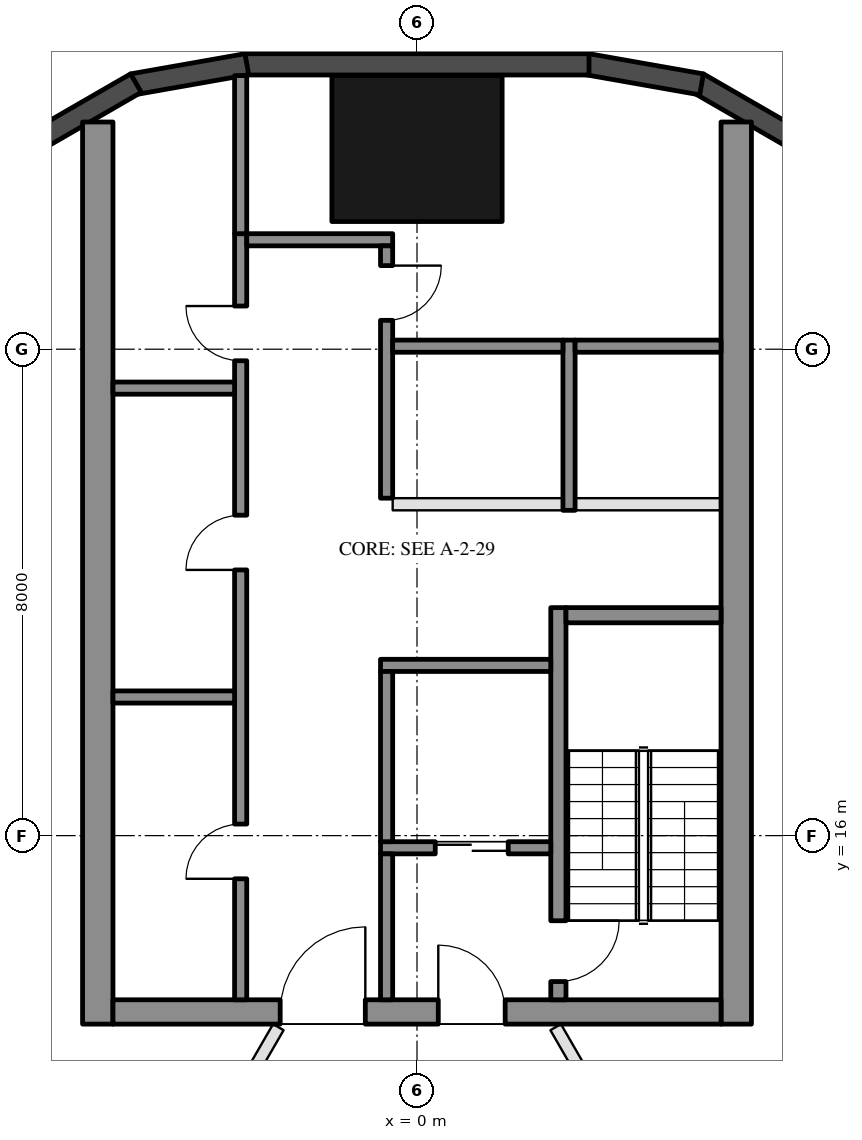
"""IFC4 building model, lengths in metres.
Left out: names, types, materials, properties, quantities, classifications, styles, units other than length and angle.
Written with IfcOpenShell. Run it as: python <this file> out.ifc"""

import sys

from ifc_helpers import new_model, si_unit, direction, frame, frame_2d, origin, origin_2d, place, context, subcontext, project, spatial, rectangle, hollow_rectangle, extrude, element, fill, save


model = new_model("IFC4")
c1 = context("Model", 3, precision=1e-05, world=origin(), true_north=direction((0.0, 1.0)))
c2 = subcontext(c1, "Body", "Model", "MODEL_VIEW")
j1 = project(units=[si_unit("LENGTHUNIT", "METRE"), si_unit("PLANEANGLEUNIT", "RADIAN")], contexts=[c1])
p1 = place(None, origin())
s1 = spatial("IfcSite", under=j1, at=p1, CompositionType="ELEMENT")
p2 = place(p1, origin())
s2 = spatial("IfcBuilding", under=s1, at=p2, CompositionType="ELEMENT")
p3 = place(p2, frame((0.0, 0.0, 127.9)))
s3 = spatial("IfcBuildingStorey", under=s2, at=p3, CompositionType="ELEMENT", Elevation=127.9)
p4 = place(p3, frame((0.0, 27.3, 0.0), z_axis=(0.0, 0.0, 1.0), x_axis=(1.0, 0.0, 0.0)))
e1 = element("IfcColumn", 1, at=p4, inside=s3, PredefinedType="COLUMN", context=c2, shape_type="SweptSolid", body=[
    extrude(hollow_rectangle(XDim=2.8, YDim=2.4, WallThickness=0.07, at=origin_2d()), origin(), (0.0, 0.0, 1.0), 3.7),
])
for number, where, z_axis, x_axis in (
    (2, (6.277, 27.422, 0.0), (0.0, 0.0, 1.0), (-0.866, 0.5, 0.0)),
    (3, (4.68, 28.356, 0.0), (0.0, 0.0, 1.0), (-0.985, 0.174, 0.0)),
):
    element("IfcWall", number, at=place(p3, frame(where, z_axis=z_axis, x_axis=x_axis)), inside=s3, PredefinedType="SOLIDWALL", context=c2, shape_type="SweptSolid", body=[
        extrude(rectangle(XDim=1.91, YDim=0.35, at=frame_2d((0.955, 0.0))), origin(), (0.0, 0.0, 1.0), 3.45),
    ])
p5 = place(p3, frame((2.829, 28.685, 0.0), z_axis=(0.0, 0.0, 1.0), x_axis=(-1.0, 0.0, 0.0)))
e4 = element("IfcWall", 4, at=p5, inside=s3, PredefinedType="SOLIDWALL", context=c2, shape_type="SweptSolid", body=[
    extrude(rectangle(XDim=5.658, YDim=0.35, at=frame_2d((2.829, 0.0))), origin(), (0.0, 0.0, 1.0), 3.45),
])
for number, where, z_axis, x_axis in (
    (5, (-2.799, 28.688, 0.0), (0.0, 0.0, 1.0), (-0.985, -0.174, 0.0)),
    (6, (-4.623, 28.377, 0.0), (0.0, 0.0, 1.0), (-0.866, -0.5, 0.0)),
):
    element("IfcWall", number, at=place(p3, frame(where, z_axis=z_axis, x_axis=x_axis)), inside=s3, PredefinedType="SOLIDWALL", context=c2, shape_type="SweptSolid", body=[
        extrude(rectangle(XDim=1.91, YDim=0.35, at=frame_2d((0.955, 0.0))), origin(), (0.0, 0.0, 1.0), 3.45),
    ])
for number, where, z_axis, x_axis in (
    (7, (5.25, 12.9, 0.0), (0.0, 0.0, 1.0), (0.0, 1.0, 0.0)),
    (8, (-5.25, 12.9, 0.0), (0.0, 0.0, 1.0), (0.0, 1.0, 0.0)),
):
    element("IfcWall", number, at=place(p3, frame(where, z_axis=z_axis, x_axis=x_axis)), inside=s3, PredefinedType="SHEAR", context=c2, shape_type="SweptSolid", body=[
        extrude(rectangle(XDim=14.837, YDim=0.5, at=frame_2d((7.418, 0.0))), origin(), (0.0, 0.0, 1.0), 3.45),
    ])
p6 = place(p3, frame((5.0, 13.1, 0.0), z_axis=(0.0, 0.0, 1.0), x_axis=(-1.0, 0.0, 0.0)))
e9 = element("IfcWall", 9, at=p6, inside=s3, PredefinedType="SHEAR", context=c2, shape_type="SweptSolid", body=[
    extrude(rectangle(XDim=10.0, YDim=0.4, at=frame_2d((5.0, 0.0))), origin(), (0.0, 0.0, 1.0), 3.45),
])
p7 = place(p6, frame((3.55, 0.0, 0.0)))
e10 = element("IfcOpeningElement", 10, at=p7, cuts=e9, PredefinedType="OPENING", context=c2, shape_type="SweptSolid", body=[
    extrude(rectangle(XDim=1.1, YDim=2.1, at=frame_2d((0.55, 1.05))), frame((0.0, 0.21, 0.0), z_axis=(0.0, -1.0, 0.0), x_axis=(1.0, 0.0, 0.0)), (0.0, 0.0, 1.0), 0.42),
])
p8 = place(p6, frame((5.85, 0.0, 0.0)))
e11 = element("IfcOpeningElement", 11, at=p8, cuts=e9, PredefinedType="OPENING", context=c2, shape_type="SweptSolid", body=[
    extrude(rectangle(XDim=1.4, YDim=2.1, at=frame_2d((0.7, 1.05))), frame((0.0, 0.21, 0.0), z_axis=(0.0, -1.0, 0.0), x_axis=(1.0, 0.0, 0.0)), (0.0, 0.0, 1.0), 0.42),
])
p9 = place(p3, frame((2.325, 13.3, 0.0), z_axis=(0.0, 0.0, 1.0), x_axis=(0.0, 1.0, 0.0)))
e12 = element("IfcWall", 12, at=p9, inside=s3, PredefinedType="SHEAR", context=c2, shape_type="SweptSolid", body=[
    extrude(rectangle(XDim=6.45, YDim=0.25, at=frame_2d((3.225, 0.0))), origin(), (0.0, 0.0, 1.0), 3.45),
])
p10 = place(p9, frame((0.3, 0.0, 0.0)))
e13 = element("IfcOpeningElement", 13, at=p10, cuts=e12, PredefinedType="OPENING", context=c2, shape_type="SweptSolid", body=[
    extrude(rectangle(XDim=1.0, YDim=2.1, at=frame_2d((0.5, 1.05))), frame((0.0, 0.135, 0.0), z_axis=(0.0, -1.0, 0.0), x_axis=(1.0, 0.0, 0.0)), (0.0, 0.0, 1.0), 0.27),
])
p11 = place(p3, frame((5.0, 19.625, 0.0), z_axis=(0.0, 0.0, 1.0), x_axis=(-1.0, 0.0, 0.0)))
e14 = element("IfcWall", 14, at=p11, inside=s3, PredefinedType="SHEAR", context=c2, shape_type="SweptSolid", body=[
    extrude(rectangle(XDim=2.55, YDim=0.25, at=frame_2d((1.275, 0.0))), origin(), (0.0, 0.0, 1.0), 3.45),
])
p12 = place(p3, frame((2.2, 18.8, 0.0), z_axis=(0.0, 0.0, 1.0), x_axis=(-1.0, 0.0, 0.0)))
e15 = element("IfcWall", 15, at=p12, inside=s3, PredefinedType="SHEAR", context=c2, shape_type="SweptSolid", body=[
    extrude(rectangle(XDim=2.8, YDim=0.2, at=frame_2d((1.4, 0.0))), origin(), (0.0, 0.0, 1.0), 3.45),
])
p13 = place(p3, frame((2.2, 15.8, 0.0), z_axis=(0.0, 0.0, 1.0), x_axis=(-1.0, 0.0, 0.0)))
e16 = element("IfcWall", 16, at=p13, inside=s3, PredefinedType="SHEAR", context=c2, shape_type="SweptSolid", body=[
    extrude(rectangle(XDim=2.8, YDim=0.2, at=frame_2d((1.4, 0.0))), origin(), (0.0, 0.0, 1.0), 3.45),
])
p14 = place(p13, frame((0.7, 0.0, 0.0)))
e17 = element("IfcOpeningElement", 17, at=p14, cuts=e16, PredefinedType="OPENING", context=c2, shape_type="SweptSolid", body=[
    extrude(rectangle(XDim=1.2, YDim=2.1, at=frame_2d((0.6, 1.05))), frame((0.0, 0.11, 0.0), z_axis=(0.0, -1.0, 0.0), x_axis=(1.0, 0.0, 0.0)), (0.0, 0.0, 1.0), 0.22),
])
p15 = place(p3, frame((-0.5, 15.9, 0.0), z_axis=(0.0, 0.0, 1.0), x_axis=(0.0, 1.0, 0.0)))
e18 = element("IfcWall", 18, at=p15, inside=s3, PredefinedType="SHEAR", context=c2, shape_type="SweptSolid", body=[
    extrude(rectangle(XDim=2.8, YDim=0.2, at=frame_2d((1.4, 0.0))), origin(), (0.0, 0.0, 1.0), 3.45),
])
p16 = place(p3, frame((-0.5, 13.3, 0.0), z_axis=(0.0, 0.0, 1.0), x_axis=(0.0, 1.0, 0.0)))
e19 = element("IfcWall", 19, at=p16, inside=s3, PredefinedType="SHEAR", context=c2, shape_type="SweptSolid", body=[
    extrude(rectangle(XDim=2.4, YDim=0.2, at=frame_2d((1.2, 0.0))), origin(), (0.0, 0.0, 1.0), 3.45),
])
p17 = place(p3, frame((-2.9, 13.3, 0.0), z_axis=(0.0, 0.0, 1.0), x_axis=(0.0, 1.0, 0.0)))
e20 = element("IfcWall", 20, at=p17, inside=s3, PredefinedType="SHEAR", context=c2, shape_type="SweptSolid", body=[
    extrude(rectangle(XDim=12.6, YDim=0.2, at=frame_2d((6.3, 0.0))), origin(), (0.0, 0.0, 1.0), 3.45),
])
p18 = place(p17, frame((1.99, 0.0, 0.0)))
e21 = element("IfcOpeningElement", 21, at=p18, cuts=e20, PredefinedType="OPENING", context=c2, shape_type="SweptSolid", body=[
    extrude(rectangle(XDim=0.9, YDim=2.1, at=frame_2d((0.45, 1.05))), frame((0.0, 0.11, 0.0), z_axis=(0.0, -1.0, 0.0), x_axis=(1.0, 0.0, 0.0)), (0.0, 0.0, 1.0), 0.22),
])
p19 = place(p17, frame((7.07, 0.0, 0.0)))
e22 = element("IfcOpeningElement", 22, at=p19, cuts=e20, PredefinedType="OPENING", context=c2, shape_type="SweptSolid", body=[
    extrude(rectangle(XDim=0.9, YDim=2.1, at=frame_2d((0.45, 1.05))), frame((0.0, 0.11, 0.0), z_axis=(0.0, -1.0, 0.0), x_axis=(1.0, 0.0, 0.0)), (0.0, 0.0, 1.0), 0.22),
])
p20 = place(p17, frame((10.51, 0.0, 0.0)))
e23 = element("IfcOpeningElement", 23, at=p20, cuts=e20, PredefinedType="OPENING", context=c2, shape_type="SweptSolid", body=[
    extrude(rectangle(XDim=0.9, YDim=2.1, at=frame_2d((0.45, 1.05))), frame((0.0, 0.11, 0.0), z_axis=(0.0, -1.0, 0.0), x_axis=(1.0, 0.0, 0.0)), (0.0, 0.0, 1.0), 0.22),
])
p21 = place(p3, frame((-0.4, 25.8, 0.0), z_axis=(0.0, 0.0, 1.0), x_axis=(-1.0, 0.0, 0.0)))
e24 = element("IfcWall", 24, at=p21, inside=s3, PredefinedType="SHEAR", context=c2, shape_type="SweptSolid", body=[
    extrude(rectangle(XDim=2.4, YDim=0.2, at=frame_2d((1.2, 0.0))), origin(), (0.0, 0.0, 1.0), 3.45),
])
p22 = place(p3, frame((-0.5, 21.55, 0.0), z_axis=(0.0, 0.0, 1.0), x_axis=(0.0, 1.0, 0.0)))
e25 = element("IfcWall", 25, at=p22, inside=s3, PredefinedType="SHEAR", context=c2, shape_type="SweptSolid", body=[
    extrude(rectangle(XDim=4.15, YDim=0.2, at=frame_2d((2.075, 0.0))), origin(), (0.0, 0.0, 1.0), 3.45),
])
p23 = place(p22, frame((2.925, 0.0, 0.0)))
e26 = element("IfcOpeningElement", 26, at=p23, cuts=e25, PredefinedType="OPENING", context=c2, shape_type="SweptSolid", body=[
    extrude(rectangle(XDim=0.9, YDim=2.1, at=frame_2d((0.45, 1.05))), frame((0.0, 0.11, 0.0), z_axis=(0.0, -1.0, 0.0), x_axis=(1.0, 0.0, 0.0)), (0.0, 0.0, 1.0), 0.22),
])
for number, where, z_axis, x_axis in (
    (27, (-3.0, 18.28, 0.0), (0.0, 0.0, 1.0), (-1.0, 0.0, 0.0)),
    (28, (-3.0, 23.36, 0.0), (0.0, 0.0, 1.0), (-1.0, 0.0, 0.0)),
):
    element("IfcWall", number, at=place(p3, frame(where, z_axis=z_axis, x_axis=x_axis)), inside=s3, PredefinedType="SHEAR", context=c2, shape_type="SweptSolid", body=[
        extrude(rectangle(XDim=2.0, YDim=0.2, at=frame_2d((1.0, 0.0))), origin(), (0.0, 0.0, 1.0), 3.45),
    ])
p24 = place(p3, frame((-2.9, 25.9, 0.0), z_axis=(0.0, 0.0, 1.0), x_axis=(0.0, 1.0, 0.0)))
e29 = element("IfcWall", 29, at=p24, inside=s3, PredefinedType="SHEAR", context=c2, shape_type="SweptSolid", body=[
    extrude(rectangle(XDim=2.6, YDim=0.2, at=frame_2d((1.3, 0.0))), origin(), (0.0, 0.0, 1.0), 3.45),
])
p25 = place(p3, frame((2.5, 21.35, 0.0), z_axis=(0.0, 0.0, 1.0), x_axis=(0.0, 1.0, 0.0)))
e30 = element("IfcWall", 30, at=p25, inside=s3, PredefinedType="SHEAR", context=c2, shape_type="SweptSolid", body=[
    extrude(rectangle(XDim=2.8, YDim=0.2, at=frame_2d((1.4, 0.0))), origin(), (0.0, 0.0, 1.0), 3.45),
])
p26 = place(p3, frame((5.0, 24.05, 0.0), z_axis=(0.0, 0.0, 1.0), x_axis=(-1.0, 0.0, 0.0)))
e31 = element("IfcWall", 31, at=p26, inside=s3, PredefinedType="SHEAR", context=c2, shape_type="SweptSolid", body=[
    extrude(rectangle(XDim=2.4, YDim=0.2, at=frame_2d((1.2, 0.0))), origin(), (0.0, 0.0, 1.0), 3.45),
])
p27 = place(p3, frame((2.4, 24.05, 0.0), z_axis=(0.0, 0.0, 1.0), x_axis=(-1.0, 0.0, 0.0)))
e32 = element("IfcWall", 32, at=p27, inside=s3, PredefinedType="SHEAR", context=c2, shape_type="SweptSolid", body=[
    extrude(rectangle(XDim=2.8, YDim=0.2, at=frame_2d((1.4, 0.0))), origin(), (0.0, 0.0, 1.0), 3.45),
])
p28 = place(p3, frame((5.0, 21.45, 0.0), z_axis=(0.0, 0.0, 1.0), x_axis=(-1.0, 0.0, 0.0)))
e33 = element("IfcWall", 33, at=p28, inside=s3, PredefinedType="PARTITIONING", context=c2, shape_type="SweptSolid", body=[
    extrude(rectangle(XDim=2.4, YDim=0.2, at=frame_2d((1.2, 0.0))), origin(), (0.0, 0.0, 1.0), 3.45),
])
p29 = place(p3, frame((2.4, 21.45, 0.0), z_axis=(0.0, 0.0, 1.0), x_axis=(-1.0, 0.0, 0.0)))
e34 = element("IfcWall", 34, at=p29, inside=s3, PredefinedType="PARTITIONING", context=c2, shape_type="SweptSolid", body=[
    extrude(rectangle(XDim=2.8, YDim=0.2, at=frame_2d((1.4, 0.0))), origin(), (0.0, 0.0, 1.0), 3.45),
])
p30 = place(p3, frame((2.281, 12.85, 0.0), z_axis=(0.0, 0.0, 1.0), x_axis=(0.499992362392, -0.866029813314, 0.0)))
e35 = element("IfcWall", 35, at=p30, inside=s3, PredefinedType="PARTITIONING", context=c2, shape_type="SweptSolid", body=[
    extrude(rectangle(XDim=7.986, YDim=0.2, at=frame_2d((3.993, 0.0))), origin(), (0.0, 0.0, 1.0), 2.76),
])
p31 = place(p30, frame((3.493, 0.0, 0.0)))
e36 = element("IfcOpeningElement", 36, at=p31, cuts=e35, PredefinedType="OPENING", context=c2, shape_type="SweptSolid", body=[
    extrude(rectangle(XDim=1.0, YDim=2.1, at=frame_2d((0.5, 1.05))), frame((0.0, 0.11, 0.0), z_axis=(0.0, -1.0, 0.0), x_axis=(1.0, 0.0, 0.0)), (0.0, 0.0, 1.0), 0.22),
])
p32 = place(p3, frame((-5.323, 7.581, 0.0), z_axis=(0.0, 0.0, 1.0), x_axis=(0.49998410452, 0.866034580849, 0.0)))
e37 = element("IfcWall", 37, at=p32, inside=s3, PredefinedType="PARTITIONING", context=c2, shape_type="SweptSolid", body=[
    extrude(rectangle(XDim=6.085, YDim=0.2, at=frame_2d((3.042, 0.0))), origin(), (0.0, 0.0, 1.0), 2.76),
])
p33 = place(p32, frame((2.542, 0.0, 0.0)))
e38 = element("IfcOpeningElement", 38, at=p33, cuts=e37, PredefinedType="OPENING", context=c2, shape_type="SweptSolid", body=[
    extrude(rectangle(XDim=1.0, YDim=2.1, at=frame_2d((0.5, 1.05))), frame((0.0, 0.11, 0.0), z_axis=(0.0, -1.0, 0.0), x_axis=(1.0, 0.0, 0.0)), (0.0, 0.0, 1.0), 0.22),
])
p34 = place(p14, origin())
e39 = element("IfcDoor", 39, at=p34, inside=s3, OperationType="DOUBLE_DOOR_SLIDING", PredefinedType="DOOR", context=c2, shape_type="SweptSolid", body=[
    extrude(rectangle(XDim=1.2, YDim=2.1, at=frame_2d((0.6, 1.05))), frame((0.0, 0.025, 0.0), z_axis=(0.0, -1.0, 0.0), x_axis=(1.0, 0.0, 0.0)), (0.0, 0.0, 1.0), 0.05),
])
fill(e17, e39)
p35 = place(p18, origin())
e40 = element("IfcDoor", 40, at=p35, inside=s3, OperationType="SINGLE_SWING_LEFT", PredefinedType="DOOR", context=c2, shape_type="SweptSolid", body=[
    extrude(rectangle(XDim=0.9, YDim=2.1, at=frame_2d((0.45, 1.05))), frame((0.0, 0.025, 0.0), z_axis=(0.0, -1.0, 0.0), x_axis=(1.0, 0.0, 0.0)), (0.0, 0.0, 1.0), 0.05),
])
fill(e21, e40)
p36 = place(p19, origin())
e41 = element("IfcDoor", 41, at=p36, inside=s3, OperationType="SINGLE_SWING_LEFT", PredefinedType="DOOR", context=c2, shape_type="SweptSolid", body=[
    extrude(rectangle(XDim=0.9, YDim=2.1, at=frame_2d((0.45, 1.05))), frame((0.0, 0.025, 0.0), z_axis=(0.0, -1.0, 0.0), x_axis=(1.0, 0.0, 0.0)), (0.0, 0.0, 1.0), 0.05),
])
fill(e22, e41)
p37 = place(p20, origin())
e42 = element("IfcDoor", 42, at=p37, inside=s3, OperationType="SINGLE_SWING_RIGHT", PredefinedType="DOOR", context=c2, shape_type="SweptSolid", body=[
    extrude(rectangle(XDim=0.9, YDim=2.1, at=frame_2d((0.45, 1.05))), frame((0.0, 0.025, 0.0), z_axis=(0.0, -1.0, 0.0), x_axis=(1.0, 0.0, 0.0)), (0.0, 0.0, 1.0), 0.05),
])
fill(e23, e42)
p38 = place(p23, frame((0.9, 0.0, 0.0), z_axis=(0.0, 0.0, 1.0), x_axis=(-1.0, 0.0, 0.0)))
e43 = element("IfcDoor", 43, at=p38, inside=s3, OperationType="SINGLE_SWING_LEFT", PredefinedType="DOOR", context=c2, shape_type="SweptSolid", body=[
    extrude(rectangle(XDim=0.9, YDim=2.1, at=frame_2d((0.45, 1.05))), frame((0.0, 0.025, 0.0), z_axis=(0.0, -1.0, 0.0), x_axis=(1.0, 0.0, 0.0)), (0.0, 0.0, 1.0), 0.05),
])
fill(e26, e43)
p39 = place(p7, frame((1.1, 0.0, 0.0), z_axis=(0.0, 0.0, 1.0), x_axis=(-1.0, 0.0, 0.0)))
e44 = element("IfcDoor", 44, at=p39, inside=s3, OperationType="SINGLE_SWING_LEFT", PredefinedType="DOOR", context=c2, shape_type="SweptSolid", body=[
    extrude(rectangle(XDim=1.1, YDim=2.1, at=frame_2d((0.55, 1.05))), frame((0.0, 0.025, 0.0), z_axis=(0.0, -1.0, 0.0), x_axis=(1.0, 0.0, 0.0)), (0.0, 0.0, 1.0), 0.05),
])
fill(e10, e44)
p40 = place(p8, frame((1.4, 0.0, 0.0), z_axis=(0.0, 0.0, 1.0), x_axis=(-1.0, 0.0, 0.0)))
e45 = element("IfcDoor", 45, at=p40, inside=s3, OperationType="DOUBLE_DOOR_SINGLE_SWING", PredefinedType="DOOR", context=c2, shape_type="SweptSolid", body=[
    extrude(rectangle(XDim=1.4, YDim=2.1, at=frame_2d((0.7, 1.05))), frame((0.0, 0.025, 0.0), z_axis=(0.0, -1.0, 0.0), x_axis=(1.0, 0.0, 0.0)), (0.0, 0.0, 1.0), 0.05),
])
fill(e11, e45)
p41 = place(p10, frame((1.0, 0.0, 0.0), z_axis=(0.0, 0.0, 1.0), x_axis=(-1.0, 0.0, 0.0)))
e46 = element("IfcDoor", 46, at=p41, inside=s3, OperationType="SINGLE_SWING_LEFT", PredefinedType="DOOR", context=c2, shape_type="SweptSolid", body=[
    extrude(rectangle(XDim=1.0, YDim=2.1, at=frame_2d((0.5, 1.05))), frame((0.0, 0.025, 0.0), z_axis=(0.0, -1.0, 0.0), x_axis=(1.0, 0.0, 0.0)), (0.0, 0.0, 1.0), 0.05),
])
fill(e13, e46)
save(model, sys.argv[1])
